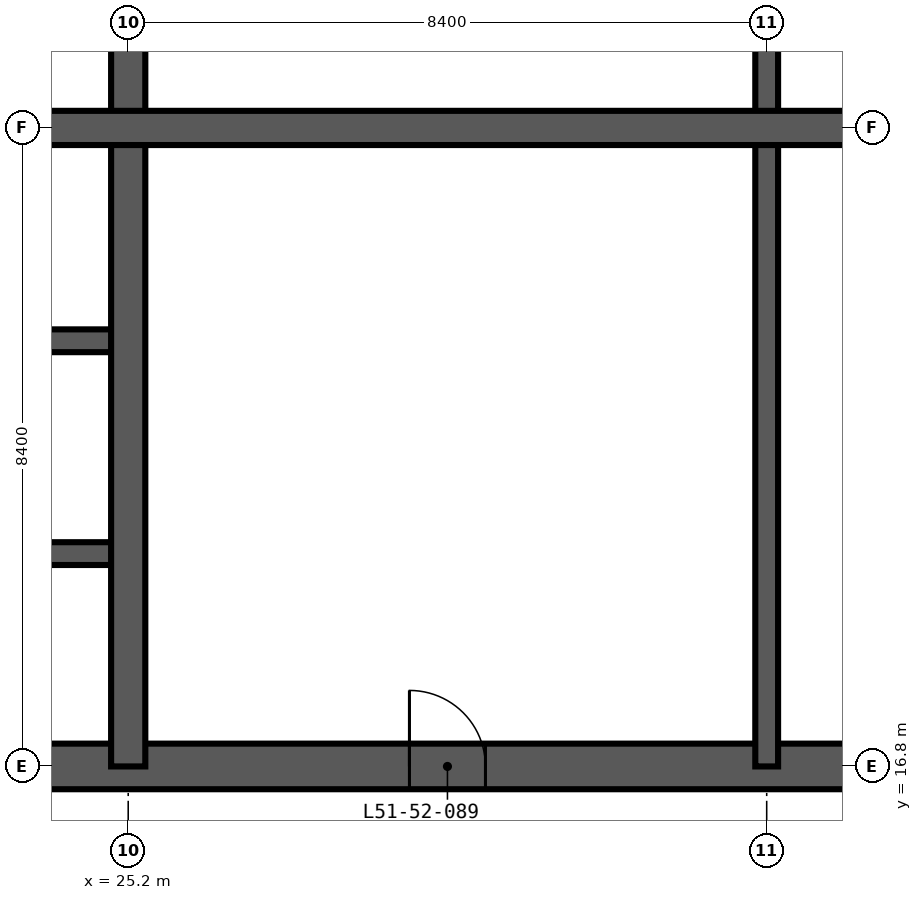
"""IFC4 building model, lengths in metres.
Left out: names, types, materials, properties, quantities, classifications, styles, units other than length and angle.
Written with IfcOpenShell. Run it as: python <this file> out.ifc"""

import sys

from ifc_helpers import new_model, si_unit, direction, frame, frame_2d, origin, place, context, subcontext, project, spatial, rectangle, extrude, element, fill, save


model = new_model("IFC4")
c1 = context("Model", 3, precision=1e-05, world=origin(), true_north=direction((0.0, 1.0)))
c2 = subcontext(c1, "Body", "Model", "MODEL_VIEW")
j1 = project(units=[si_unit("LENGTHUNIT", "METRE"), si_unit("PLANEANGLEUNIT", "RADIAN")], contexts=[c1])
p1 = place(None, origin())
s1 = spatial("IfcSite", under=j1, at=p1, CompositionType="ELEMENT")
p2 = place(p1, origin())
s2 = spatial("IfcBuilding", under=s1, at=p2, CompositionType="ELEMENT")
p3 = place(p2, frame((0.0, 0.0, 198.6)))
s3 = spatial("IfcBuildingStorey", under=s2, at=p3, CompositionType="ELEMENT", Elevation=198.6)
p4 = place(p3, frame((16.5, 16.8, -0.35), z_axis=(0.0, 0.0, 1.0), x_axis=(1.0, 0.0, 0.0)))
e1 = element("IfcWall", 1, at=p4, inside=s3, PredefinedType="SHEAR", context=c2, shape_type="SweptSolid", body=[
    extrude(rectangle(XDim=25.8, YDim=0.6, at=frame_2d((12.9, 0.0))), origin(), (0.0, 0.0, 1.0), 3.6),
])
p5 = place(p4, frame((12.4, 0.0, 0.35)))
e2 = element("IfcOpeningElement", 2, at=p5, cuts=e1, PredefinedType="OPENING", context=c2, shape_type="SweptSolid", body=[
    extrude(rectangle(XDim=1.0, YDim=2.1, at=frame_2d((0.5, 1.05))), frame((0.0, 0.31, 0.0), z_axis=(0.0, -1.0, 0.0), x_axis=(1.0, 0.0, 0.0)), (0.0, 0.0, 1.0), 0.62),
])
p6 = place(p4, frame((18.7, 0.0, 0.35)))
e3 = element("IfcOpeningElement", 3, at=p6, cuts=e1, PredefinedType="OPENING", context=c2, shape_type="SweptSolid", body=[
    extrude(rectangle(XDim=1.0, YDim=2.1, at=frame_2d((0.5, 1.05))), frame((0.0, 0.31, 0.0), z_axis=(0.0, -1.0, 0.0), x_axis=(1.0, 0.0, 0.0)), (0.0, 0.0, 1.0), 0.62),
])
p7 = place(p3, frame((33.6, 16.8, -0.35), z_axis=(0.0, 0.0, 1.0), x_axis=(0.0, 1.0, 0.0)))
e4 = element("IfcWall", 4, at=p7, inside=s3, PredefinedType="SHEAR", context=c2, shape_type="SweptSolid", body=[
    extrude(rectangle(XDim=25.2, YDim=0.3, at=frame_2d((12.6, 0.0))), origin(), (0.0, 0.0, 1.0), 3.6),
])
p8 = place(p7, frame((22.5, 0.0, 0.35)))
e5 = element("IfcOpeningElement", 5, at=p8, cuts=e4, PredefinedType="OPENING", context=c2, shape_type="SweptSolid", body=[
    extrude(rectangle(XDim=1.2, YDim=2.2, at=frame_2d((0.6, 1.1))), frame((0.0, 0.16, 0.0), z_axis=(0.0, -1.0, 0.0), x_axis=(1.0, 0.0, 0.0)), (0.0, 0.0, 1.0), 0.32),
])
p9 = place(p7, frame((18.3, 0.0, 0.35)))
e6 = element("IfcOpeningElement", 6, at=p9, cuts=e4, PredefinedType="OPENING", context=c2, shape_type="SweptSolid", body=[
    extrude(rectangle(XDim=1.2, YDim=2.2, at=frame_2d((0.6, 1.1))), frame((0.0, 0.16, 0.0), z_axis=(0.0, -1.0, 0.0), x_axis=(1.0, 0.0, 0.0)), (0.0, 0.0, 1.0), 0.32),
])
p10 = place(p7, frame((12.1, 0.0, 0.35)))
e7 = element("IfcOpeningElement", 7, at=p10, cuts=e4, PredefinedType="OPENING", context=c2, shape_type="SweptSolid", body=[
    extrude(rectangle(XDim=1.0, YDim=2.1, at=frame_2d((0.5, 1.05))), frame((0.0, 0.16, 0.0), z_axis=(0.0, -1.0, 0.0), x_axis=(1.0, 0.0, 0.0)), (0.0, 0.0, 1.0), 0.32),
])
p11 = place(p3, frame((16.8, 19.6, -0.35), z_axis=(0.0, 0.0, 1.0), x_axis=(1.0, 0.0, 0.0)))
e8 = element("IfcWall", 8, at=p11, inside=s3, PredefinedType="SHEAR", context=c2, shape_type="SweptSolid", body=[
    extrude(rectangle(XDim=8.4, YDim=0.3, at=frame_2d((4.2, 0.0))), origin(), (0.0, 0.0, 1.0), 3.6),
])
p12 = place(p11, frame((1.6, 0.0, 0.35)))
e9 = element("IfcOpeningElement", 9, at=p12, cuts=e8, PredefinedType="OPENING", context=c2, shape_type="SweptSolid", body=[
    extrude(rectangle(XDim=1.0, YDim=2.1, at=frame_2d((0.5, 1.05))), frame((0.0, 0.16, 0.0), z_axis=(0.0, -1.0, 0.0), x_axis=(1.0, 0.0, 0.0)), (0.0, 0.0, 1.0), 0.32),
])
p13 = place(p11, frame((5.8, 0.0, 0.35)))
e10 = element("IfcOpeningElement", 10, at=p13, cuts=e8, PredefinedType="OPENING", context=c2, shape_type="SweptSolid", body=[
    extrude(rectangle(XDim=1.0, YDim=2.1, at=frame_2d((0.5, 1.05))), frame((0.0, 0.16, 0.0), z_axis=(0.0, -1.0, 0.0), x_axis=(1.0, 0.0, 0.0)), (0.0, 0.0, 1.0), 0.32),
])
p14 = place(p3, frame((16.8, 22.4, -0.35), z_axis=(0.0, 0.0, 1.0), x_axis=(1.0, 0.0, 0.0)))
e11 = element("IfcWall", 11, at=p14, inside=s3, PredefinedType="SHEAR", context=c2, shape_type="SweptSolid", body=[
    extrude(rectangle(XDim=8.4, YDim=0.3, at=frame_2d((4.2, 0.0))), origin(), (0.0, 0.0, 1.0), 3.6),
])
p15 = place(p14, frame((1.6, 0.0, 0.35)))
e12 = element("IfcOpeningElement", 12, at=p15, cuts=e11, PredefinedType="OPENING", context=c2, shape_type="SweptSolid", body=[
    extrude(rectangle(XDim=1.0, YDim=2.1, at=frame_2d((0.5, 1.05))), frame((0.0, 0.16, 0.0), z_axis=(0.0, -1.0, 0.0), x_axis=(1.0, 0.0, 0.0)), (0.0, 0.0, 1.0), 0.32),
])
p16 = place(p14, frame((5.8, 0.0, 0.35)))
e13 = element("IfcOpeningElement", 13, at=p16, cuts=e11, PredefinedType="OPENING", context=c2, shape_type="SweptSolid", body=[
    extrude(rectangle(XDim=1.0, YDim=2.1, at=frame_2d((0.5, 1.05))), frame((0.0, 0.16, 0.0), z_axis=(0.0, -1.0, 0.0), x_axis=(1.0, 0.0, 0.0)), (0.0, 0.0, 1.0), 0.32),
])
for number, where, z_axis, x_axis in (
    (14, (25.2, 16.8, -0.35), (0.0, 0.0, 1.0), (0.0, 1.0, 0.0)),
    (15, (16.8, 25.2, -0.35), (0.0, 0.0, 1.0), (1.0, 0.0, 0.0)),
):
    element("IfcWall", number, at=place(p3, frame(where, z_axis=z_axis, x_axis=x_axis)), inside=s3, PredefinedType="SHEAR", context=c2, shape_type="SweptSolid", body=[
        extrude(rectangle(XDim=25.2, YDim=0.45, at=frame_2d((12.6, 0.0))), origin(), (0.0, 0.0, 1.0), 3.6),
    ])
p17 = place(p5, origin())
e16 = element("IfcDoor", 16, at=p17, inside=s3, OperationType="SINGLE_SWING_LEFT", PredefinedType="DOOR", context=c2, shape_type="SweptSolid", body=[
    extrude(rectangle(XDim=1.0, YDim=2.1, at=frame_2d((0.5, 1.05))), frame((0.0, 0.025, 0.0), z_axis=(0.0, -1.0, 0.0), x_axis=(1.0, 0.0, 0.0)), (0.0, 0.0, 1.0), 0.05),
])
fill(e2, e16)
save(model, sys.argv[1])
